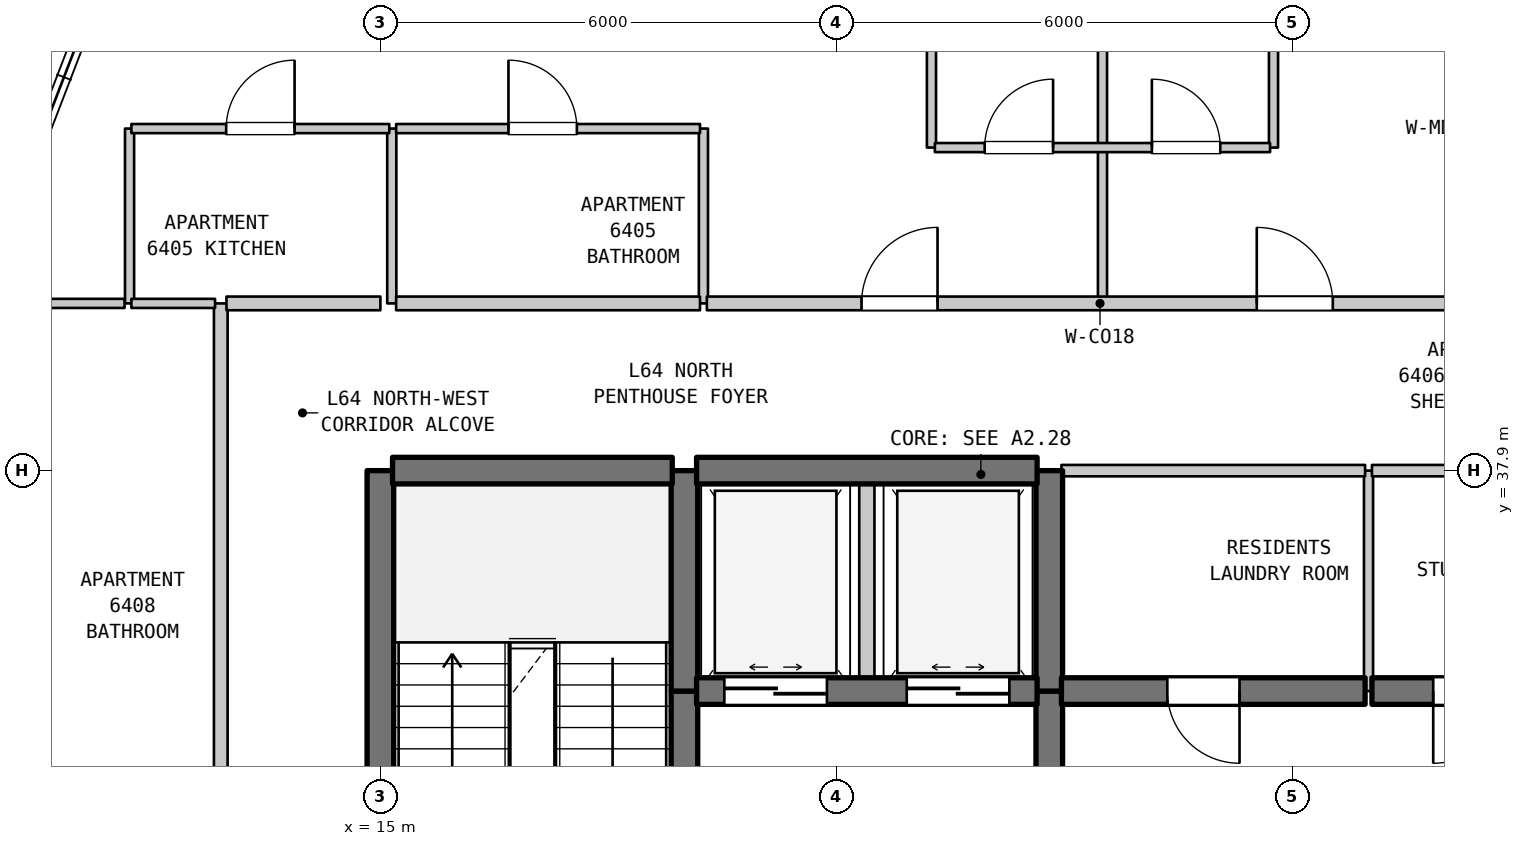
"""IFC4 building model, lengths in metres.
Left out: names, types, materials, properties, quantities, classifications, styles, units other than length and angle.
Written with IfcOpenShell. Run it as: python <this file> out.ifc"""

import sys

from ifc_helpers import new_model, si_unit, direction, frame, frame_2d, origin, place, context, subcontext, project, spatial, rectangle, extrude, element, fill, save


model = new_model("IFC4")
c1 = context("Model", 3, precision=1e-05, world=origin(), true_north=direction((0.0, 1.0)))
c2 = subcontext(c1, "Body", "Model", "MODEL_VIEW")
j1 = project(units=[si_unit("LENGTHUNIT", "METRE"), si_unit("PLANEANGLEUNIT", "RADIAN")], contexts=[c1])
p1 = place(None, origin())
s1 = spatial("IfcSite", under=j1, at=p1, CompositionType="ELEMENT")
p2 = place(p1, origin())
s2 = spatial("IfcBuilding", under=s1, at=p2, CompositionType="ELEMENT")
p3 = place(p2, frame((0.0, 0.0, 258.4)))
s3 = spatial("IfcBuildingStorey", under=s2, at=p3, CompositionType="ELEMENT", Elevation=258.4)
p4 = place(p3, frame((11.7, 40.1, 0.0), z_axis=(0.0, 0.0, 1.0), x_axis=(0.0, 1.0, 0.0)))
e1 = element("IfcWall", 1, at=p4, inside=s3, PredefinedType="PARTITIONING", context=c2, shape_type="SweptSolid", body=[
    extrude(rectangle(XDim=2.3, YDim=0.12, at=frame_2d((1.15, 0.0))), origin(), (0.0, 0.0, 1.0), 3.39),
])
p5 = place(p3, frame((12.9, 31.5, 0.0), z_axis=(0.0, 0.0, 1.0), x_axis=(0.0, 1.0, 0.0)))
e2 = element("IfcWall", 2, at=p5, inside=s3, PredefinedType="STANDARD", context=c2, shape_type="SweptSolid", body=[
    extrude(rectangle(XDim=8.6, YDim=0.18, at=frame_2d((4.3, 0.0))), origin(), (0.0, 0.0, 1.0), 3.39),
])
p6 = place(p3, frame((15.0, 31.1, 0.0), z_axis=(0.0, 0.0, 1.0), x_axis=(0.0, 1.0, 0.0)))
e3 = element("IfcWall", 3, at=p6, inside=s3, PredefinedType="SHEAR", context=c2, shape_type="SweptSolid", body=[
    extrude(rectangle(XDim=6.8, YDim=0.35, at=frame_2d((3.4, 0.0))), origin(), (0.0, 0.0, 1.0), 3.39),
])
p7 = place(p3, frame((15.15, 40.1, 0.0), z_axis=(0.0, 0.0, 1.0), x_axis=(0.0, 1.0, 0.0)))
e4 = element("IfcWall", 4, at=p7, inside=s3, PredefinedType="PARTITIONING", context=c2, shape_type="SweptSolid", body=[
    extrude(rectangle(XDim=2.3, YDim=0.12, at=frame_2d((1.15, 0.0))), origin(), (0.0, 0.0, 1.0), 3.39),
])
p8 = place(p3, frame((19.0, 29.5, 0.0), z_axis=(0.0, 0.0, 1.0), x_axis=(0.0, 1.0, 0.0)))
e5 = element("IfcWall", 5, at=p8, inside=s3, PredefinedType="SHEAR", context=c2, shape_type="SweptSolid", body=[
    extrude(rectangle(XDim=5.5, YDim=0.35, at=frame_2d((2.75, 0.0))), origin(), (0.0, 0.0, 1.0), 3.39),
])
p9 = place(p8, frame((2.025, 0.0, 0.0)))
e6 = element("IfcOpeningElement", 6, at=p9, cuts=e5, PredefinedType="OPENING", context=c2, shape_type="SweptSolid", body=[
    extrude(rectangle(XDim=1.1, YDim=2.15, at=frame_2d((0.55, 1.075))), frame((0.0, 0.185, 0.0), z_axis=(0.0, -1.0, 0.0), x_axis=(1.0, 0.0, 0.0)), (0.0, 0.0, 1.0), 0.37),
])
p10 = place(p3, frame((19.0, 35.0, 0.0), z_axis=(0.0, 0.0, 1.0), x_axis=(0.0, 1.0, 0.0)))
e7 = element("IfcWall", 7, at=p10, inside=s3, PredefinedType="SHEAR", context=c2, shape_type="SweptSolid", body=[
    extrude(rectangle(XDim=2.9, YDim=0.35, at=frame_2d((1.45, 0.0))), origin(), (0.0, 0.0, 1.0), 3.39),
])
p11 = place(p3, frame((19.25, 40.1, 0.0), z_axis=(0.0, 0.0, 1.0), x_axis=(0.0, 1.0, 0.0)))
e8 = element("IfcWall", 8, at=p11, inside=s3, PredefinedType="PARTITIONING", context=c2, shape_type="SweptSolid", body=[
    extrude(rectangle(XDim=2.3, YDim=0.12, at=frame_2d((1.15, 0.0))), origin(), (0.0, 0.0, 1.0), 3.39),
])
p12 = place(p3, frame((21.4, 35.0, 0.0), z_axis=(0.0, 0.0, 1.0), x_axis=(0.0, 1.0, 0.0)))
e9 = element("IfcWall", 9, at=p12, inside=s3, PredefinedType="STANDARD", context=c2, shape_type="SweptSolid", body=[
    extrude(rectangle(XDim=2.9, YDim=0.2, at=frame_2d((1.45, 0.0))), origin(), (0.0, 0.0, 1.0), 3.39),
])
p13 = place(p3, frame((22.25, 42.15, 0.0), z_axis=(0.0, 0.0, 1.0), x_axis=(0.0, 1.0, 0.0)))
e10 = element("IfcWall", 10, at=p13, inside=s3, PredefinedType="PARTITIONING", context=c2, shape_type="SweptSolid", body=[
    extrude(rectangle(XDim=11.74, YDim=0.12, at=frame_2d((5.87, 0.0))), origin(), (0.0, 0.0, 1.0), 3.39),
])
p14 = place(p3, frame((23.8, 31.5, 0.0), z_axis=(0.0, 0.0, 1.0), x_axis=(0.0, 1.0, 0.0)))
e11 = element("IfcWall", 11, at=p14, inside=s3, PredefinedType="SHEAR", context=c2, shape_type="SweptSolid", body=[
    extrude(rectangle(XDim=3.5, YDim=0.35, at=frame_2d((1.75, 0.0))), origin(), (0.0, 0.0, 1.0), 3.39),
])
p15 = place(p14, frame((1.127, 0.0, 0.0)))
e12 = element("IfcOpeningElement", 12, at=p15, cuts=e11, PredefinedType="OPENING", context=c2, shape_type="SweptSolid", body=[
    extrude(rectangle(XDim=1.1, YDim=2.15, at=frame_2d((0.55, 1.075))), frame((0.0, 0.185, 0.0), z_axis=(0.0, -1.0, 0.0), x_axis=(1.0, 0.0, 0.0)), (0.0, 0.0, 1.0), 0.37),
])
p16 = place(p3, frame((23.8, 35.0, 0.0), z_axis=(0.0, 0.0, 1.0), x_axis=(0.0, 1.0, 0.0)))
e13 = element("IfcWall", 13, at=p16, inside=s3, PredefinedType="SHEAR", context=c2, shape_type="SweptSolid", body=[
    extrude(rectangle(XDim=2.9, YDim=0.35, at=frame_2d((1.45, 0.0))), origin(), (0.0, 0.0, 1.0), 3.39),
])
p17 = place(p3, frame((24.5, 40.1, 0.0), z_axis=(0.0, 0.0, 1.0), x_axis=(0.0, 1.0, 0.0)))
e14 = element("IfcWall", 14, at=p17, inside=s3, PredefinedType="PARTITIONING", context=c2, shape_type="SweptSolid", body=[
    extrude(rectangle(XDim=2.05, YDim=0.12, at=frame_2d((1.025, 0.0))), origin(), (0.0, 0.0, 1.0), 3.39),
])
for number, where, z_axis, x_axis in (
    (15, (24.5, 42.15, 0.0), (0.0, 0.0, 1.0), (0.0, 1.0, 0.0)),
    (16, (26.75, 42.15, 0.0), (0.0, 0.0, 1.0), (0.0, 1.0, 0.0)),
):
    element("IfcWall", number, at=place(p3, frame(where, z_axis=z_axis, x_axis=x_axis)), inside=s3, PredefinedType="PARTITIONING", context=c2, shape_type="SweptSolid", body=[
        extrude(rectangle(XDim=11.74, YDim=0.12, at=frame_2d((5.87, 0.0))), origin(), (0.0, 0.0, 1.0), 3.39),
    ])
p18 = place(p3, frame((28.0, 35.0, 0.0), z_axis=(0.0, 0.0, 1.0), x_axis=(0.0, 1.0, 0.0)))
e17 = element("IfcWall", 17, at=p18, inside=s3, PredefinedType="PARTITIONING", context=c2, shape_type="SweptSolid", body=[
    extrude(rectangle(XDim=2.9, YDim=0.12, at=frame_2d((1.45, 0.0))), origin(), (0.0, 0.0, 1.0), 3.39),
])
p19 = place(p3, frame((19.16, 35.0, 0.0), z_axis=(0.0, 0.0, 1.0), x_axis=(1.0, 0.0, 0.0)))
e18 = element("IfcWall", 18, at=p19, inside=s3, PredefinedType="SHEAR", context=c2, shape_type="SweptSolid", body=[
    extrude(rectangle(XDim=4.48, YDim=0.35, at=frame_2d((2.24, 0.0))), origin(), (0.0, 0.0, 1.0), 3.39),
])
p20 = place(p19, frame((0.365, 0.0, 0.0)))
e19 = element("IfcOpeningElement", 19, at=p20, cuts=e18, PredefinedType="OPENING", context=c2, shape_type="SweptSolid", body=[
    extrude(rectangle(XDim=1.35, YDim=2.2, at=frame_2d((0.675, 1.1))), frame((0.0, 0.185, 0.0), z_axis=(0.0, -1.0, 0.0), x_axis=(1.0, 0.0, 0.0)), (0.0, 0.0, 1.0), 0.37),
])
p21 = place(p19, frame((2.765, 0.0, 0.0)))
e20 = element("IfcOpeningElement", 20, at=p21, cuts=e18, PredefinedType="OPENING", context=c2, shape_type="SweptSolid", body=[
    extrude(rectangle(XDim=1.35, YDim=2.2, at=frame_2d((0.675, 1.1))), frame((0.0, 0.185, 0.0), z_axis=(0.0, -1.0, 0.0), x_axis=(1.0, 0.0, 0.0)), (0.0, 0.0, 1.0), 0.37),
])
p22 = place(p3, frame((23.96, 35.0, 0.0), z_axis=(0.0, 0.0, 1.0), x_axis=(1.0, 0.0, 0.0)))
e21 = element("IfcWall", 21, at=p22, inside=s3, PredefinedType="SHEAR", context=c2, shape_type="SweptSolid", body=[
    extrude(rectangle(XDim=3.995, YDim=0.35, at=frame_2d((1.998, 0.0))), origin(), (0.0, 0.0, 1.0), 3.39),
])
p23 = place(p22, frame((1.393, 0.0, 0.0)))
e22 = element("IfcOpeningElement", 22, at=p23, cuts=e21, PredefinedType="OPENING", context=c2, shape_type="SweptSolid", body=[
    extrude(rectangle(XDim=0.95, YDim=2.15, at=frame_2d((0.475, 1.075))), frame((0.0, 0.185, 0.0), z_axis=(0.0, -1.0, 0.0), x_axis=(1.0, 0.0, 0.0)), (0.0, 0.0, 1.0), 0.37),
])
p24 = place(p3, frame((28.045, 35.0, 0.0), z_axis=(0.0, 0.0, 1.0), x_axis=(1.0, 0.0, 0.0)))
e23 = element("IfcWall", 23, at=p24, inside=s3, PredefinedType="SHEAR", context=c2, shape_type="SweptSolid", body=[
    extrude(rectangle(XDim=2.595, YDim=0.35, at=frame_2d((1.297, 0.0))), origin(), (0.0, 0.0, 1.0), 3.39),
])
p25 = place(p24, frame((0.806, 0.0, 0.0)))
e24 = element("IfcOpeningElement", 24, at=p25, cuts=e23, PredefinedType="OPENING", context=c2, shape_type="SweptSolid", body=[
    extrude(rectangle(XDim=0.95, YDim=2.15, at=frame_2d((0.475, 1.075))), frame((0.0, 0.185, 0.0), z_axis=(0.0, -1.0, 0.0), x_axis=(1.0, 0.0, 0.0)), (0.0, 0.0, 1.0), 0.37),
])
p26 = place(p3, frame((15.16, 37.9, 0.0), z_axis=(0.0, 0.0, 1.0), x_axis=(1.0, 0.0, 0.0)))
e25 = element("IfcWall", 25, at=p26, inside=s3, PredefinedType="SHEAR", context=c2, shape_type="SweptSolid", body=[
    extrude(rectangle(XDim=3.68, YDim=0.35, at=frame_2d((1.84, 0.0))), origin(), (0.0, 0.0, 1.0), 3.39),
])
p27 = place(p3, frame((19.16, 37.9, 0.0), z_axis=(0.0, 0.0, 1.0), x_axis=(1.0, 0.0, 0.0)))
e26 = element("IfcWall", 26, at=p27, inside=s3, PredefinedType="SHEAR", context=c2, shape_type="SweptSolid", body=[
    extrude(rectangle(XDim=4.48, YDim=0.35, at=frame_2d((2.24, 0.0))), origin(), (0.0, 0.0, 1.0), 3.39),
])
p28 = place(p3, frame((23.96, 37.9, 0.0), z_axis=(0.0, 0.0, 1.0), x_axis=(1.0, 0.0, 0.0)))
e27 = element("IfcWall", 27, at=p28, inside=s3, PredefinedType="STANDARD", context=c2, shape_type="SweptSolid", body=[
    extrude(rectangle(XDim=3.995, YDim=0.15, at=frame_2d((1.998, 0.0))), origin(), (0.0, 0.0, 1.0), 2.89),
])
p29 = place(p3, frame((28.045, 37.9, 0.0), z_axis=(0.0, 0.0, 1.0), x_axis=(1.0, 0.0, 0.0)))
e28 = element("IfcWall", 28, at=p29, inside=s3, PredefinedType="STANDARD", context=c2, shape_type="SweptSolid", body=[
    extrude(rectangle(XDim=2.695, YDim=0.15, at=frame_2d((1.348, 0.0))), origin(), (0.0, 0.0, 1.0), 2.89),
])
p30 = place(p3, frame((10.623, 40.1, 0.0), z_axis=(0.0, 0.0, 1.0), x_axis=(1.0, 0.0, 0.0)))
e29 = element("IfcWall", 29, at=p30, inside=s3, PredefinedType="PARTITIONING", context=c2, shape_type="SweptSolid", body=[
    extrude(rectangle(XDim=1.011, YDim=0.12, at=frame_2d((0.505, 0.0))), origin(), (0.0, 0.0, 1.0), 3.39),
])
p31 = place(p3, frame((11.724, 40.1, 0.0), z_axis=(0.0, 0.0, 1.0), x_axis=(1.0, 0.0, 0.0)))
e30 = element("IfcWall", 30, at=p31, inside=s3, PredefinedType="PARTITIONING", context=c2, shape_type="SweptSolid", body=[
    extrude(rectangle(XDim=1.101, YDim=0.12, at=frame_2d((0.55, 0.0))), origin(), (0.0, 0.0, 1.0), 3.39),
])
p32 = place(p3, frame((12.975, 40.1, 0.0), z_axis=(0.0, 0.0, 1.0), x_axis=(1.0, 0.0, 0.0)))
e31 = element("IfcWall", 31, at=p32, inside=s3, PredefinedType="STANDARD", context=c2, shape_type="SweptSolid", body=[
    extrude(rectangle(XDim=2.025, YDim=0.18, at=frame_2d((1.012, 0.0))), origin(), (0.0, 0.0, 1.0), 3.39),
])
p33 = place(p3, frame((15.207, 40.1, 0.0), z_axis=(0.0, 0.0, 1.0), x_axis=(1.0, 0.0, 0.0)))
e32 = element("IfcWall", 32, at=p33, inside=s3, PredefinedType="STANDARD", context=c2, shape_type="SweptSolid", body=[
    extrude(rectangle(XDim=3.998, YDim=0.18, at=frame_2d((1.999, 0.0))), origin(), (0.0, 0.0, 1.0), 3.39),
])
p34 = place(p3, frame((19.295, 40.1, 0.0), z_axis=(0.0, 0.0, 1.0), x_axis=(1.0, 0.0, 0.0)))
e33 = element("IfcWall", 33, at=p34, inside=s3, PredefinedType="STANDARD", context=c2, shape_type="SweptSolid", body=[
    extrude(rectangle(XDim=10.345, YDim=0.18, at=frame_2d((5.172, 0.0))), origin(), (0.0, 0.0, 1.0), 3.39),
])
p35 = place(p34, frame((2.035, 0.0, 0.0)))
e34 = element("IfcOpeningElement", 34, at=p35, cuts=e33, PredefinedType="OPENING", context=c2, shape_type="SweptSolid", body=[
    extrude(rectangle(XDim=1.0, YDim=2.15, at=frame_2d((0.5, 1.075))), frame((0.0, 0.1, 0.0), z_axis=(0.0, -1.0, 0.0), x_axis=(1.0, 0.0, 0.0)), (0.0, 0.0, 1.0), 0.2),
])
p36 = place(p34, frame((7.235, 0.0, 0.0)))
e35 = element("IfcOpeningElement", 35, at=p36, cuts=e33, PredefinedType="OPENING", context=c2, shape_type="SweptSolid", body=[
    extrude(rectangle(XDim=1.0, YDim=2.15, at=frame_2d((0.5, 1.075))), frame((0.0, 0.1, 0.0), z_axis=(0.0, -1.0, 0.0), x_axis=(1.0, 0.0, 0.0)), (0.0, 0.0, 1.0), 0.2),
])
p37 = place(p3, frame((22.295, 42.15, 0.0), z_axis=(0.0, 0.0, 1.0), x_axis=(1.0, 0.0, 0.0)))
e36 = element("IfcWall", 36, at=p37, inside=s3, PredefinedType="PARTITIONING", context=c2, shape_type="SweptSolid", body=[
    extrude(rectangle(XDim=4.41, YDim=0.12, at=frame_2d((2.205, 0.0))), origin(), (0.0, 0.0, 1.0), 3.39),
])
p38 = place(p37, frame((0.655, 0.0, 0.0)))
e37 = element("IfcOpeningElement", 37, at=p38, cuts=e36, PredefinedType="OPENING", context=c2, shape_type="SweptSolid", body=[
    extrude(rectangle(XDim=0.9, YDim=2.15, at=frame_2d((0.45, 1.075))), frame((0.0, 0.07, 0.0), z_axis=(0.0, -1.0, 0.0), x_axis=(1.0, 0.0, 0.0)), (0.0, 0.0, 1.0), 0.14),
])
p39 = place(p37, frame((2.855, 0.0, 0.0)))
e38 = element("IfcOpeningElement", 38, at=p39, cuts=e36, PredefinedType="OPENING", context=c2, shape_type="SweptSolid", body=[
    extrude(rectangle(XDim=0.9, YDim=2.15, at=frame_2d((0.45, 1.075))), frame((0.0, 0.07, 0.0), z_axis=(0.0, -1.0, 0.0), x_axis=(1.0, 0.0, 0.0)), (0.0, 0.0, 1.0), 0.14),
])
p40 = place(p3, frame((11.724, 42.4, 0.0), z_axis=(0.0, 0.0, 1.0), x_axis=(1.0, 0.0, 0.0)))
e39 = element("IfcWall", 39, at=p40, inside=s3, PredefinedType="PARTITIONING", context=c2, shape_type="SweptSolid", body=[
    extrude(rectangle(XDim=3.393, YDim=0.12, at=frame_2d((1.696, 0.0))), origin(), (0.0, 0.0, 1.0), 3.39),
])
p41 = place(p40, frame((1.247, 0.0, 0.0)))
e40 = element("IfcOpeningElement", 40, at=p41, cuts=e39, PredefinedType="OPENING", context=c2, shape_type="SweptSolid", body=[
    extrude(rectangle(XDim=0.9, YDim=2.15, at=frame_2d((0.45, 1.075))), frame((0.0, 0.07, 0.0), z_axis=(0.0, -1.0, 0.0), x_axis=(1.0, 0.0, 0.0)), (0.0, 0.0, 1.0), 0.14),
])
p42 = place(p3, frame((15.207, 42.4, 0.0), z_axis=(0.0, 0.0, 1.0), x_axis=(1.0, 0.0, 0.0)))
e41 = element("IfcWall", 41, at=p42, inside=s3, PredefinedType="PARTITIONING", context=c2, shape_type="SweptSolid", body=[
    extrude(rectangle(XDim=3.998, YDim=0.12, at=frame_2d((1.999, 0.0))), origin(), (0.0, 0.0, 1.0), 3.39),
])
p43 = place(p42, frame((1.478, 0.0, 0.0)))
e42 = element("IfcOpeningElement", 42, at=p43, cuts=e41, PredefinedType="OPENING", context=c2, shape_type="SweptSolid", body=[
    extrude(rectangle(XDim=0.9, YDim=2.1, at=frame_2d((0.45, 1.05))), frame((0.0, 0.07, 0.0), z_axis=(0.0, -1.0, 0.0), x_axis=(1.0, 0.0, 0.0)), (0.0, 0.0, 1.0), 0.14),
])
p44 = place(p20, origin())
e43 = element("IfcDoor", 43, at=p44, inside=s3, OperationType="DOUBLE_DOOR_SLIDING", PredefinedType="DOOR", context=c2, shape_type="SweptSolid", body=[
    extrude(rectangle(XDim=1.35, YDim=2.2, at=frame_2d((0.675, 1.1))), frame((0.0, 0.025, 0.0), z_axis=(0.0, -1.0, 0.0), x_axis=(1.0, 0.0, 0.0)), (0.0, 0.0, 1.0), 0.05),
])
fill(e19, e43)
p45 = place(p21, origin())
e44 = element("IfcDoor", 44, at=p45, inside=s3, OperationType="DOUBLE_DOOR_SLIDING", PredefinedType="DOOR", context=c2, shape_type="SweptSolid", body=[
    extrude(rectangle(XDim=1.35, YDim=2.2, at=frame_2d((0.675, 1.1))), frame((0.0, 0.025, 0.0), z_axis=(0.0, -1.0, 0.0), x_axis=(1.0, 0.0, 0.0)), (0.0, 0.0, 1.0), 0.05),
])
fill(e20, e44)
p46 = place(p23, frame((0.95, 0.0, 0.0), z_axis=(0.0, 0.0, 1.0), x_axis=(-1.0, 0.0, 0.0)))
e45 = element("IfcDoor", 45, at=p46, inside=s3, OperationType="SINGLE_SWING_RIGHT", PredefinedType="DOOR", context=c2, shape_type="SweptSolid", body=[
    extrude(rectangle(XDim=0.95, YDim=2.15, at=frame_2d((0.475, 1.075))), frame((0.0, 0.025, 0.0), z_axis=(0.0, -1.0, 0.0), x_axis=(1.0, 0.0, 0.0)), (0.0, 0.0, 1.0), 0.05),
])
fill(e22, e45)
p47 = place(p25, frame((0.95, 0.0, 0.0), z_axis=(0.0, 0.0, 1.0), x_axis=(-1.0, 0.0, 0.0)))
e46 = element("IfcDoor", 46, at=p47, inside=s3, OperationType="SINGLE_SWING_LEFT", PredefinedType="DOOR", context=c2, shape_type="SweptSolid", body=[
    extrude(rectangle(XDim=0.95, YDim=2.15, at=frame_2d((0.475, 1.075))), frame((0.0, 0.025, 0.0), z_axis=(0.0, -1.0, 0.0), x_axis=(1.0, 0.0, 0.0)), (0.0, 0.0, 1.0), 0.05),
])
fill(e24, e46)
p48 = place(p35, origin())
e47 = element("IfcDoor", 47, at=p48, inside=s3, OperationType="SINGLE_SWING_RIGHT", PredefinedType="DOOR", context=c2, shape_type="SweptSolid", body=[
    extrude(rectangle(XDim=1.0, YDim=2.15, at=frame_2d((0.5, 1.075))), frame((0.0, 0.025, 0.0), z_axis=(0.0, -1.0, 0.0), x_axis=(1.0, 0.0, 0.0)), (0.0, 0.0, 1.0), 0.05),
])
fill(e34, e47)
p49 = place(p36, origin())
e48 = element("IfcDoor", 48, at=p49, inside=s3, OperationType="SINGLE_SWING_LEFT", PredefinedType="DOOR", context=c2, shape_type="SweptSolid", body=[
    extrude(rectangle(XDim=1.0, YDim=2.15, at=frame_2d((0.5, 1.075))), frame((0.0, 0.025, 0.0), z_axis=(0.0, -1.0, 0.0), x_axis=(1.0, 0.0, 0.0)), (0.0, 0.0, 1.0), 0.05),
])
fill(e35, e48)
p50 = place(p38, origin())
e49 = element("IfcDoor", 49, at=p50, inside=s3, OperationType="SINGLE_SWING_RIGHT", PredefinedType="DOOR", context=c2, shape_type="SweptSolid", body=[
    extrude(rectangle(XDim=0.9, YDim=2.15, at=frame_2d((0.45, 1.075))), frame((0.0, 0.025, 0.0), z_axis=(0.0, -1.0, 0.0), x_axis=(1.0, 0.0, 0.0)), (0.0, 0.0, 1.0), 0.05),
])
fill(e37, e49)
p51 = place(p39, origin())
e50 = element("IfcDoor", 50, at=p51, inside=s3, OperationType="SINGLE_SWING_LEFT", PredefinedType="DOOR", context=c2, shape_type="SweptSolid", body=[
    extrude(rectangle(XDim=0.9, YDim=2.15, at=frame_2d((0.45, 1.075))), frame((0.0, 0.025, 0.0), z_axis=(0.0, -1.0, 0.0), x_axis=(1.0, 0.0, 0.0)), (0.0, 0.0, 1.0), 0.05),
])
fill(e38, e50)
p52 = place(p41, origin())
e51 = element("IfcDoor", 51, at=p52, inside=s3, OperationType="SINGLE_SWING_RIGHT", PredefinedType="DOOR", context=c2, shape_type="SweptSolid", body=[
    extrude(rectangle(XDim=0.9, YDim=2.15, at=frame_2d((0.45, 1.075))), frame((0.0, 0.025, 0.0), z_axis=(0.0, -1.0, 0.0), x_axis=(1.0, 0.0, 0.0)), (0.0, 0.0, 1.0), 0.05),
])
fill(e40, e51)
p53 = place(p43, origin())
e52 = element("IfcDoor", 52, at=p53, inside=s3, OperationType="SINGLE_SWING_LEFT", PredefinedType="DOOR", context=c2, shape_type="SweptSolid", body=[
    extrude(rectangle(XDim=0.9, YDim=2.1, at=frame_2d((0.45, 1.05))), frame((0.0, 0.025, 0.0), z_axis=(0.0, -1.0, 0.0), x_axis=(1.0, 0.0, 0.0)), (0.0, 0.0, 1.0), 0.05),
])
fill(e42, e52)
save(model, sys.argv[1])
